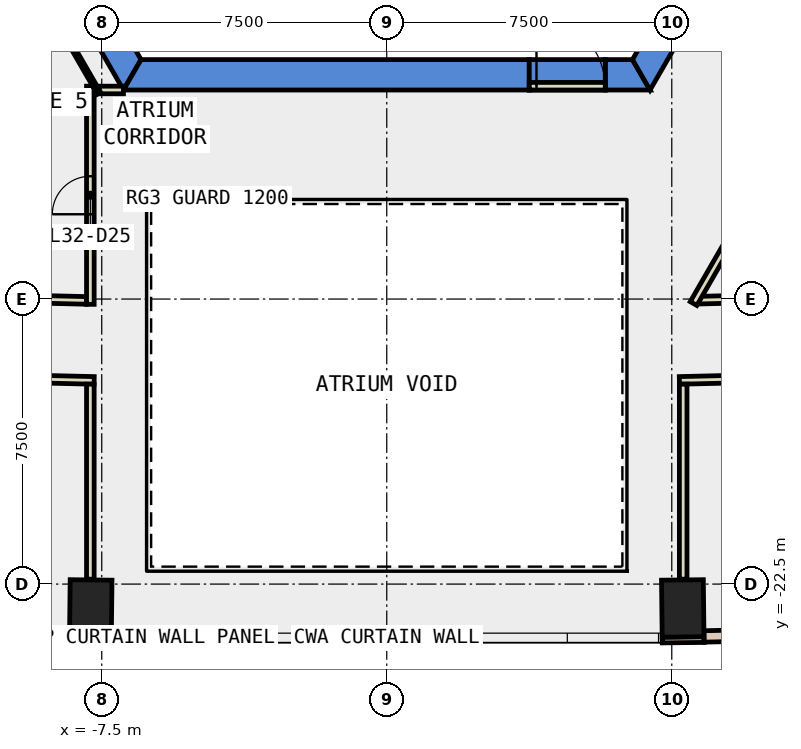
"""IFC4 building model, lengths in metres.
Left out: names, types, materials, properties, quantities, classifications, styles, units other than length and angle.
Written with IfcOpenShell. Run it as: python <this file> out.ifc"""

import sys

from ifc_helpers import new_model, si_unit, direction, frame, frame_2d, origin, origin_2d, place, context, subcontext, project, spatial, polyline, rectangle, outline, extrude, element, fill, save


model = new_model("IFC4")
c1 = context("Model", 3, precision=1e-05, world=origin(), true_north=direction((0.0, 1.0)))
c2 = subcontext(c1, "Body", "Model", "MODEL_VIEW")
j1 = project(units=[si_unit("LENGTHUNIT", "METRE"), si_unit("PLANEANGLEUNIT", "RADIAN")], contexts=[c1])
p1 = place(None, origin())
s1 = spatial("IfcSite", under=j1, at=p1, CompositionType="ELEMENT")
p2 = place(p1, origin())
s2 = spatial("IfcBuilding", under=s1, at=p2, CompositionType="ELEMENT")
p3 = place(p2, frame((0.0, 0.0, 146.6)))
s3 = spatial("IfcBuildingStorey", under=s2, at=p3, CompositionType="ELEMENT", Elevation=146.6)
for number, where, z_axis, x_axis in (
    (1, (-7.789, -23.141, -0.4), (0.0, 0.0, 1.0), (-1.0, 0.012, 0.0)),
    (2, (7.789, -23.141, -0.4), (0.0, 0.0, 1.0), (1.0, 0.012, 0.0)),
):
    element("IfcColumn", number, at=place(p3, frame(where, z_axis=z_axis, x_axis=x_axis)), inside=s3, PredefinedType="COLUMN", context=c2, shape_type="SweptSolid", body=[
        extrude(rectangle(XDim=1.1, YDim=1.5, at=origin_2d()), origin(), (0.0, 0.0, 1.0), 4.2),
    ])
p4 = place(p3, frame((0.0, 0.0, -0.4)))
e3 = element("IfcWall", 3, at=p4, inside=s3, PredefinedType="SHEAR", context=c2, shape_type="SweptSolid", body=[
    extrude(outline(polyline([(-13.856, 2.5), (-6.928, -9.5), (-6.466, -8.7), (-12.933, 2.5), (-13.856, 2.5)])), origin(), (0.0, 0.0, 1.0), 4.2),
])
p5 = place(p3, frame((0.0, 0.0, -0.4)))
e4 = element("IfcWall", 4, at=p5, inside=s3, PredefinedType="SHEAR", context=c2, shape_type="SweptSolid", body=[
    extrude(outline(polyline([(3.75, -9.5), (3.75, -8.7), (-6.466, -8.7), (-6.928, -9.5), (3.75, -9.5)])), origin(), (0.0, 0.0, 1.0), 4.2),
])
p6 = place(p3, frame((0.0, 0.0, -0.4)))
e5 = element("IfcWall", 5, at=p6, inside=s3, PredefinedType="SHEAR", context=c2, shape_type="SweptSolid", body=[
    extrude(outline(polyline([(5.75, -8.7), (5.75, -9.5), (6.928, -9.5), (6.466, -8.7), (5.75, -8.7)])), origin(), (0.0, 0.0, 1.0), 4.2),
])
p7 = place(p3, frame((0.0, 0.0, 3.6)))
e6 = element("IfcWall", 6, at=p7, inside=s3, PredefinedType="SHEAR", context=c2, shape_type="SweptSolid", body=[
    extrude(outline(polyline([(5.75, -9.5), (5.75, -8.7), (3.75, -8.7), (3.75, -9.5), (5.75, -9.5)])), origin(), (0.0, 0.0, 1.0), 0.2),
])
p8 = place(p3, frame((0.0, 0.0, -0.4)))
e7 = element("IfcWall", 7, at=p8, inside=s3, PredefinedType="SHEAR", context=c2, shape_type="SweptSolid", body=[
    extrude(outline(polyline([(8.117, -7.44), (7.424, -7.04), (6.466, -8.7), (6.928, -9.5), (8.117, -7.44)])), origin(), (0.0, 0.0, 1.0), 4.2),
])
for number, where, z_axis, x_axis in (
    (8, (-8.349, -23.96, 0.0), (0.0, 0.0, 1.0), (1.0, -0.011, 0.0)),
    (9, (7.249, -23.972, 0.0), (0.0, 0.0, 1.0), (1.0, 0.011, 0.0)),
):
    element("IfcWall", number, at=place(p3, frame(where, z_axis=z_axis, x_axis=x_axis)), inside=s3, PredefinedType="STANDARD", context=c2, shape_type="SweptSolid", body=[
        extrude(rectangle(XDim=1.1, YDim=0.15, at=frame_2d((0.55, 0.0))), origin(), (0.0, 0.0, 1.0), 3.8),
    ])
p9 = place(p3, frame((-15.68, -23.705, 0.0), z_axis=(0.0, 0.0, 1.0), x_axis=(0.999722302867, -0.023565168146, 0.0)))
e10 = element("IfcWall", 10, at=p9, inside=s3, PredefinedType="STANDARD", context=c2, shape_type="SweptSolid", body=[
    extrude(rectangle(XDim=7.335, YDim=0.3, at=frame_2d((3.667, 0.0))), origin(), (0.0, 0.0, 1.0), 3.8),
])
p10 = place(p9, frame((0.634, 0.0, 0.9)))
e11 = element("IfcOpeningElement", 11, at=p10, cuts=e10, PredefinedType="OPENING", context=c2, shape_type="SweptSolid", body=[
    extrude(rectangle(XDim=2.4, YDim=2.6, at=frame_2d((1.2, 1.3))), frame((0.0, 0.16, 0.0), z_axis=(0.0, -1.0, 0.0), x_axis=(1.0, 0.0, 0.0)), (0.0, 0.0, 1.0), 0.32),
])
p11 = place(p9, frame((4.301, 0.0, 0.9)))
e12 = element("IfcOpeningElement", 12, at=p11, cuts=e10, PredefinedType="OPENING", context=c2, shape_type="SweptSolid", body=[
    extrude(rectangle(XDim=2.4, YDim=2.6, at=frame_2d((1.2, 1.3))), frame((0.0, 0.16, 0.0), z_axis=(0.0, -1.0, 0.0), x_axis=(1.0, 0.0, 0.0)), (0.0, 0.0, 1.0), 0.32),
])
p12 = place(p3, frame((8.347, -23.878, 0.0), z_axis=(0.0, 0.0, 1.0), x_axis=(0.999722302867, 0.023565168146, 0.0)))
e13 = element("IfcWall", 13, at=p12, inside=s3, PredefinedType="STANDARD", context=c2, shape_type="SweptSolid", body=[
    extrude(rectangle(XDim=7.335, YDim=0.3, at=frame_2d((3.667, 0.0))), origin(), (0.0, 0.0, 1.0), 3.8),
])
p13 = place(p12, frame((0.634, 0.0, 0.9)))
e14 = element("IfcOpeningElement", 14, at=p13, cuts=e13, PredefinedType="OPENING", context=c2, shape_type="SweptSolid", body=[
    extrude(rectangle(XDim=2.4, YDim=2.6, at=frame_2d((1.2, 1.3))), frame((0.0, 0.16, 0.0), z_axis=(0.0, -1.0, 0.0), x_axis=(1.0, 0.0, 0.0)), (0.0, 0.0, 1.0), 0.32),
])
p14 = place(p12, frame((4.301, 0.0, 0.9)))
e15 = element("IfcOpeningElement", 15, at=p14, cuts=e13, PredefinedType="OPENING", context=c2, shape_type="SweptSolid", body=[
    extrude(rectangle(XDim=2.4, YDim=2.6, at=frame_2d((1.2, 1.3))), frame((0.0, 0.16, 0.0), z_axis=(0.0, -1.0, 0.0), x_axis=(1.0, 0.0, 0.0)), (0.0, 0.0, 1.0), 0.32),
])
p15 = place(p3, frame((8.223, -15.029, 0.0), z_axis=(0.0, 0.0, 1.0), x_axis=(0.99971920994, 0.023696018186, 0.0)))
e16 = element("IfcWall", 16, at=p15, inside=s3, PredefinedType="PARTITIONING", context=c2, shape_type="SweptSolid", body=[
    extrude(rectangle(XDim=7.727, YDim=0.2, at=frame_2d((3.864, 0.0))), origin(), (0.0, 0.0, 1.0), 3.8),
])
p16 = place(p3, frame((-10.155, -14.983, 0.0), z_axis=(0.0, 0.0, 1.0), x_axis=(0.999724165956, -0.023485995887, 0.0)))
e17 = element("IfcWall", 17, at=p16, inside=s3, PredefinedType="PARTITIONING", context=c2, shape_type="SweptSolid", body=[
    extrude(rectangle(XDim=2.256, YDim=0.2, at=frame_2d((1.128, 0.0))), origin(), (0.0, 0.0, 1.0), 3.8),
])
p17 = place(p3, frame((16.09, -16.943, 0.0), z_axis=(0.0, 0.0, 1.0), x_axis=(-0.999721662071, -0.023592337425, 0.0)))
e18 = element("IfcWall", 18, at=p17, inside=s3, PredefinedType="PARTITIONING", context=c2, shape_type="SweptSolid", body=[
    extrude(rectangle(XDim=8.393, YDim=0.2, at=frame_2d((4.196, 0.0))), origin(), (0.0, 0.0, 1.0), 3.8),
])
p18 = place(p17, frame((3.696, 0.0, 0.0)))
e19 = element("IfcOpeningElement", 19, at=p18, cuts=e18, PredefinedType="OPENING", context=c2, shape_type="SweptSolid", body=[
    extrude(rectangle(XDim=1.0, YDim=2.1, at=frame_2d((0.5, 1.05))), frame((0.0, 0.11, 0.0), z_axis=(0.0, -1.0, 0.0), x_axis=(1.0, 0.0, 0.0)), (0.0, 0.0, 1.0), 0.22),
])
p19 = place(p3, frame((-7.7, -17.141, 0.0), z_axis=(0.0, 0.0, 1.0), x_axis=(-0.999722699727, 0.023548325865, 0.0)))
e20 = element("IfcWall", 20, at=p19, inside=s3, PredefinedType="PARTITIONING", context=c2, shape_type="SweptSolid", body=[
    extrude(rectangle(XDim=8.242, YDim=0.2, at=frame_2d((4.121, 0.0))), origin(), (0.0, 0.0, 1.0), 3.8),
])
p20 = place(p19, frame((3.696, 0.0, 0.0)))
e21 = element("IfcOpeningElement", 21, at=p20, cuts=e20, PredefinedType="OPENING", context=c2, shape_type="SweptSolid", body=[
    extrude(rectangle(XDim=1.0, YDim=2.1, at=frame_2d((0.5, 1.05))), frame((0.0, 0.11, 0.0), z_axis=(0.0, -1.0, 0.0), x_axis=(1.0, 0.0, 0.0)), (0.0, 0.0, 1.0), 0.22),
])
p21 = place(p3, frame((-7.572, -9.499, 0.0), z_axis=(0.0, 0.0, 1.0), x_axis=(1.0, 0.0, 0.0)))
e22 = element("IfcWall", 22, at=p21, inside=s3, PredefinedType="PARTITIONING", context=c2, shape_type="SweptSolid", body=[
    extrude(rectangle(XDim=0.643, YDim=0.2, at=frame_2d((0.322, 0.0))), origin(), (0.0, 0.0, 1.0), 3.8),
])
p22 = place(p3, frame((-7.8, -15.139, 0.0), z_axis=(0.0, 0.0, 1.0), x_axis=(0.0, 1.0, 0.0)))
e23 = element("IfcWall", 23, at=p22, inside=s3, PredefinedType="PARTITIONING", context=c2, shape_type="SweptSolid", body=[
    extrude(rectangle(XDim=5.74, YDim=0.2, at=frame_2d((2.87, 0.0))), origin(), (0.0, 0.0, 1.0), 3.8),
])
p23 = place(p22, frame((2.37, 0.0, 0.0)))
e24 = element("IfcOpeningElement", 24, at=p23, cuts=e23, PredefinedType="OPENING", context=c2, shape_type="SweptSolid", body=[
    extrude(rectangle(XDim=1.0, YDim=2.1, at=frame_2d((0.5, 1.05))), frame((0.0, 0.11, 0.0), z_axis=(0.0, -1.0, 0.0), x_axis=(1.0, 0.0, 0.0)), (0.0, 0.0, 1.0), 0.22),
])
for number, where, z_axis, x_axis in (
    (25, (7.8, -17.239, 0.0), (0.0, 0.0, 1.0), (0.0, -1.0, 0.0)),
    (26, (-7.8, -22.371, 0.0), (0.0, 0.0, 1.0), (0.0, 1.0, 0.0)),
):
    element("IfcWall", number, at=place(p3, frame(where, z_axis=z_axis, x_axis=x_axis)), inside=s3, PredefinedType="PARTITIONING", context=c2, shape_type="SweptSolid", body=[
        extrude(rectangle(XDim=5.132, YDim=0.2, at=frame_2d((2.566, 0.0))), origin(), (0.0, 0.0, 1.0), 3.8),
    ])
p24 = place(p3, frame((-7.572, -9.586, 0.0), z_axis=(0.0, 0.0, 1.0), x_axis=(-0.500037407586, 0.866003805427, 0.0)))
e27 = element("IfcWall", 27, at=p24, inside=s3, PredefinedType="PARTITIONING", context=c2, shape_type="SweptSolid", body=[
    extrude(rectangle(XDim=4.115, YDim=0.1, at=frame_2d((2.058, 0.0))), origin(), (0.0, 0.0, 1.0), 3.8),
])
p25 = place(p3, frame((3.75, -9.4, 0.0), z_axis=(0.0, 0.0, 1.0), x_axis=(1.0, 0.0, 0.0)))
e28 = element("IfcWall", 28, at=p25, inside=s3, PredefinedType="PARTITIONING", context=c2, shape_type="SweptSolid", body=[
    extrude(rectangle(XDim=2.0, YDim=0.2, at=frame_2d((1.0, 0.0))), origin(), (0.0, 0.0, 1.0), 2.4),
])
p26 = place(p25, frame((0.19, 0.0, 0.0)))
e29 = element("IfcOpeningElement", 29, at=p26, cuts=e28, PredefinedType="OPENING", context=c2, shape_type="SweptSolid", body=[
    extrude(rectangle(XDim=1.8, YDim=2.1, at=frame_2d((0.9, 1.05))), frame((0.0, 0.11, 0.0), z_axis=(0.0, -1.0, 0.0), x_axis=(1.0, 0.0, 0.0)), (0.0, 0.0, 1.0), 0.22),
])
p27 = place(p3, frame((12.401, -7.621, 0.0), z_axis=(0.0, 0.0, 1.0), x_axis=(-0.499964151829, -0.866046099747, 0.0)))
e30 = element("IfcWall", 30, at=p27, inside=s3, PredefinedType="PARTITIONING", context=c2, shape_type="SweptSolid", body=[
    extrude(rectangle(XDim=8.656, YDim=0.2, at=frame_2d((4.328, 0.0))), origin(), (0.0, 0.0, 1.0), 3.8),
])
p28 = place(p27, frame((2.694, 0.0, 0.0)))
e31 = element("IfcOpeningElement", 31, at=p28, cuts=e30, PredefinedType="OPENING", context=c2, shape_type="SweptSolid", body=[
    extrude(rectangle(XDim=1.0, YDim=2.1, at=frame_2d((0.5, 1.05))), frame((0.0, 0.11, 0.0), z_axis=(0.0, -1.0, 0.0), x_axis=(1.0, 0.0, 0.0)), (0.0, 0.0, 1.0), 0.22),
])
p29 = place(p27, frame((3.794, 0.0, 0.0)))
e32 = element("IfcOpeningElement", 32, at=p29, cuts=e30, PredefinedType="OPENING", context=c2, shape_type="SweptSolid", body=[
    extrude(rectangle(XDim=1.0, YDim=2.1, at=frame_2d((0.5, 1.05))), frame((0.0, 0.11, 0.0), z_axis=(0.0, -1.0, 0.0), x_axis=(1.0, 0.0, 0.0)), (0.0, 0.0, 1.0), 0.22),
])
p30 = place(p23, origin())
e33 = element("IfcDoor", 33, at=p30, inside=s3, OperationType="SINGLE_SWING_LEFT", PredefinedType="DOOR", context=c2, shape_type="SweptSolid", body=[
    extrude(rectangle(XDim=1.0, YDim=2.1, at=frame_2d((0.5, 1.05))), frame((0.0, 0.025, 0.0), z_axis=(0.0, -1.0, 0.0), x_axis=(1.0, 0.0, 0.0)), (0.0, 0.0, 1.0), 0.05),
])
fill(e24, e33)
p31 = place(p26, origin())
e34 = element("IfcDoor", 34, at=p31, inside=s3, OperationType="DOUBLE_DOOR_SINGLE_SWING", PredefinedType="DOOR", context=c2, shape_type="SweptSolid", body=[
    extrude(rectangle(XDim=1.8, YDim=2.1, at=frame_2d((0.9, 1.05))), frame((0.0, 0.025, 0.0), z_axis=(0.0, -1.0, 0.0), x_axis=(1.0, 0.0, 0.0)), (0.0, 0.0, 1.0), 0.05),
])
fill(e29, e34)
save(model, sys.argv[1])
